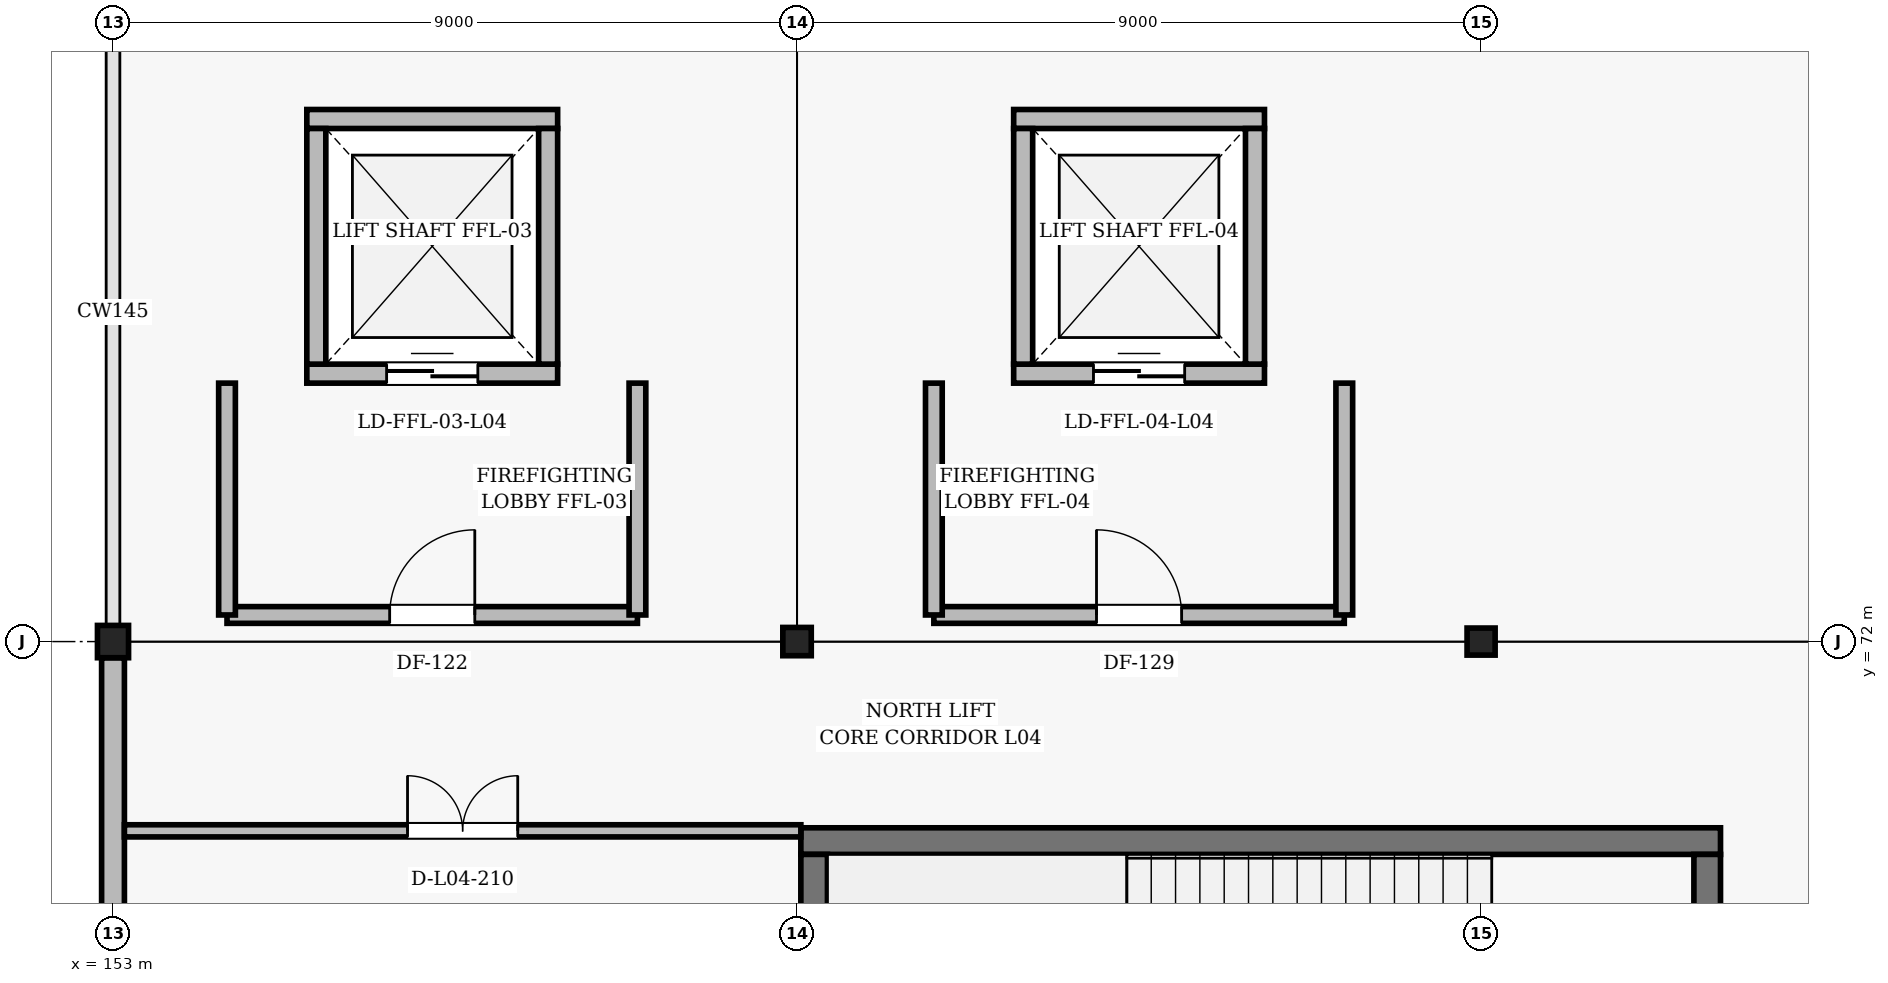
"""IFC4 building model, lengths in metres.
Left out: names, types, materials, properties, quantities, classifications, styles, units other than length and angle.
Written with IfcOpenShell. Run it as: python <this file> out.ifc"""

import sys

from ifc_helpers import new_model, si_unit, direction, frame, frame_2d, origin, origin_2d, place, context, subcontext, project, spatial, rectangle, i_section, extrude, element, fill, save


model = new_model("IFC4")
c1 = context("Model", 3, precision=1e-05, world=origin(), true_north=direction((0.0, 1.0)))
c2 = subcontext(c1, "Body", "Model", "MODEL_VIEW")
j1 = project(units=[si_unit("LENGTHUNIT", "METRE"), si_unit("PLANEANGLEUNIT", "RADIAN")], contexts=[c1])
p1 = place(None, origin())
s1 = spatial("IfcSite", under=j1, at=p1, CompositionType="ELEMENT")
p2 = place(p1, origin())
s2 = spatial("IfcBuilding", under=s1, at=p2, CompositionType="ELEMENT")
p3 = place(p2, frame((0.0, 0.0, 20.4)))
s3 = spatial("IfcBuildingStorey", under=s2, at=p3, CompositionType="ELEMENT", Elevation=20.4)
p4 = place(p3, frame((153.0, 72.0, 0.0), z_axis=(0.0, 0.0, 1.0), x_axis=(1.0, 0.0, 0.0)))
e1 = element("IfcColumn", 1, at=p4, inside=s3, PredefinedType="COLUMN", context=c2, shape_type="SweptSolid", body=[
    extrude(i_section(OverallWidth=0.409, OverallDepth=0.425, WebThickness=0.031, FlangeThickness=0.049, FilletRadius=0.02, at=origin_2d()), origin(), (0.0, 0.0, 1.0), 4.8),
])
p5 = place(p3, frame((162.0, 72.0, 0.0), z_axis=(0.0, 0.0, 1.0), x_axis=(1.0, 0.0, 0.0)))
e2 = element("IfcColumn", 2, at=p5, inside=s3, PredefinedType="COLUMN", context=c2, shape_type="SweptSolid", body=[
    extrude(i_section(OverallWidth=0.374, OverallDepth=0.372, WebThickness=0.016, FlangeThickness=0.026, FilletRadius=0.016, at=origin_2d()), origin(), (0.0, 0.0, 1.0), 4.8),
])
p6 = place(p3, frame((171.0, 72.0, 0.0), z_axis=(0.0, 0.0, 1.0), x_axis=(1.0, 0.0, 0.0)))
e3 = element("IfcColumn", 3, at=p6, inside=s3, PredefinedType="COLUMN", context=c2, shape_type="SweptSolid", body=[
    extrude(i_section(OverallWidth=0.369, OverallDepth=0.356, WebThickness=0.011, FlangeThickness=0.018, FilletRadius=0.015, at=origin_2d()), origin(), (0.0, 0.0, 1.0), 4.8),
])
p7 = place(p3, frame((153.0, 63.347, 0.0), z_axis=(0.0, 0.0, 1.0), x_axis=(0.0, 1.0, 0.0)))
e4 = element("IfcWall", 4, at=p7, inside=s3, PredefinedType="SOLIDWALL", context=c2, shape_type="SweptSolid", body=[
    extrude(rectangle(XDim=8.44, YDim=0.3, at=frame_2d((4.22, 0.0))), origin(), (0.0, 0.0, 1.0), 3.772),
])
p8 = place(p3, frame((174.15, 69.375, 0.0), z_axis=(0.0, 0.0, 1.0), x_axis=(-1.0, 0.0, 0.0)))
e5 = element("IfcWall", 5, at=p8, inside=s3, PredefinedType="SHEAR", context=c2, shape_type="SweptSolid", body=[
    extrude(rectangle(XDim=12.1, YDim=0.35, at=frame_2d((6.05, 0.0))), origin(), (0.0, 0.0, 1.0), 4.56),
])
p9 = place(p3, frame((162.225, 69.2, 0.0), z_axis=(0.0, 0.0, 1.0), x_axis=(0.0, -1.0, 0.0)))
e6 = element("IfcWall", 6, at=p9, inside=s3, PredefinedType="SHEAR", context=c2, shape_type="SweptSolid", body=[
    extrude(rectangle(XDim=5.5, YDim=0.35, at=frame_2d((2.75, 0.0))), origin(), (0.0, 0.0, 1.0), 4.56),
])
p10 = place(p3, frame((173.975, 63.7, 0.0), z_axis=(0.0, 0.0, 1.0), x_axis=(0.0, 1.0, 0.0)))
e7 = element("IfcWall", 7, at=p10, inside=s3, PredefinedType="SHEAR", context=c2, shape_type="SweptSolid", body=[
    extrude(rectangle(XDim=5.5, YDim=0.35, at=frame_2d((2.75, 0.0))), origin(), (0.0, 0.0, 1.0), 4.56),
])
p11 = place(p10, frame((1.85, 0.0, 0.0)))
e8 = element("IfcOpeningElement", 8, at=p11, cuts=e7, PredefinedType="OPENING", context=c2, shape_type="SweptSolid", body=[
    extrude(rectangle(XDim=1.8, YDim=2.2, at=frame_2d((0.9, 1.1))), frame((0.0, 0.185, 0.0), z_axis=(0.0, -1.0, 0.0), x_axis=(1.0, 0.0, 0.0)), (0.0, 0.0, 1.0), 0.37),
])
p12 = place(p3, frame((155.55, 75.525, 0.0), z_axis=(0.0, 0.0, 1.0), x_axis=(1.0, 0.0, 0.0)))
e9 = element("IfcWall", 9, at=p12, inside=s3, PredefinedType="SOLIDWALL", context=c2, shape_type="SweptSolid", body=[
    extrude(rectangle(XDim=3.3, YDim=0.25, at=frame_2d((1.65, 0.0))), origin(), (0.0, 0.0, 1.0), 4.56),
])
p13 = place(p12, frame((1.05, 0.0, 0.0)))
e10 = element("IfcOpeningElement", 10, at=p13, cuts=e9, PredefinedType="OPENING", context=c2, shape_type="SweptSolid", body=[
    extrude(rectangle(XDim=1.2, YDim=2.25, at=frame_2d((0.6, 1.125))), frame((0.0, 0.135, 0.0), z_axis=(0.0, -1.0, 0.0), x_axis=(1.0, 0.0, 0.0)), (0.0, 0.0, 1.0), 0.27),
])
p14 = place(p3, frame((158.85, 78.875, 0.0), z_axis=(0.0, 0.0, 1.0), x_axis=(-1.0, 0.0, 0.0)))
e11 = element("IfcWall", 11, at=p14, inside=s3, PredefinedType="SOLIDWALL", context=c2, shape_type="SweptSolid", body=[
    extrude(rectangle(XDim=3.3, YDim=0.25, at=frame_2d((1.65, 0.0))), origin(), (0.0, 0.0, 1.0), 4.56),
])
for number, where, z_axis, x_axis in (
    (12, (155.675, 78.75, 0.0), (0.0, 0.0, 1.0), (0.0, -1.0, 0.0)),
    (13, (158.725, 75.65, 0.0), (0.0, 0.0, 1.0), (0.0, 1.0, 0.0)),
):
    element("IfcWall", number, at=place(p3, frame(where, z_axis=z_axis, x_axis=x_axis)), inside=s3, PredefinedType="SOLIDWALL", context=c2, shape_type="SweptSolid", body=[
        extrude(rectangle(XDim=3.1, YDim=0.25, at=frame_2d((1.55, 0.0))), origin(), (0.0, 0.0, 1.0), 4.56),
    ])
p15 = place(p3, frame((154.5, 72.35, 0.0), z_axis=(0.0, 0.0, 1.0), x_axis=(1.0, 0.0, 0.0)))
e14 = element("IfcWall", 14, at=p15, inside=s3, PredefinedType="SOLIDWALL", context=c2, shape_type="SweptSolid", body=[
    extrude(rectangle(XDim=5.4, YDim=0.22, at=frame_2d((2.7, 0.0))), origin(), (0.0, 0.0, 1.0), 3.772),
])
p16 = place(p15, frame((2.14, 0.0, 0.0)))
e15 = element("IfcOpeningElement", 15, at=p16, cuts=e14, PredefinedType="OPENING", context=c2, shape_type="SweptSolid", body=[
    extrude(rectangle(XDim=1.12, YDim=2.2, at=frame_2d((0.56, 1.1))), frame((0.0, 0.12, 0.0), z_axis=(0.0, -1.0, 0.0), x_axis=(1.0, 0.0, 0.0)), (0.0, 0.0, 1.0), 0.24),
])
for number, where, z_axis, x_axis in (
    (16, (154.5, 72.35, 0.0), (0.0, 0.0, 1.0), (0.0, 1.0, 0.0)),
    (17, (159.9, 72.35, 0.0), (0.0, 0.0, 1.0), (0.0, 1.0, 0.0)),
):
    element("IfcWall", number, at=place(p3, frame(where, z_axis=z_axis, x_axis=x_axis)), inside=s3, PredefinedType="SOLIDWALL", context=c2, shape_type="SweptSolid", body=[
        extrude(rectangle(XDim=3.05, YDim=0.22, at=frame_2d((1.525, 0.0))), origin(), (0.0, 0.0, 1.0), 3.772),
    ])
p17 = place(p3, frame((164.85, 75.525, 0.0), z_axis=(0.0, 0.0, 1.0), x_axis=(1.0, 0.0, 0.0)))
e18 = element("IfcWall", 18, at=p17, inside=s3, PredefinedType="SOLIDWALL", context=c2, shape_type="SweptSolid", body=[
    extrude(rectangle(XDim=3.3, YDim=0.25, at=frame_2d((1.65, 0.0))), origin(), (0.0, 0.0, 1.0), 4.56),
])
p18 = place(p17, frame((1.05, 0.0, 0.0)))
e19 = element("IfcOpeningElement", 19, at=p18, cuts=e18, PredefinedType="OPENING", context=c2, shape_type="SweptSolid", body=[
    extrude(rectangle(XDim=1.2, YDim=2.25, at=frame_2d((0.6, 1.125))), frame((0.0, 0.135, 0.0), z_axis=(0.0, -1.0, 0.0), x_axis=(1.0, 0.0, 0.0)), (0.0, 0.0, 1.0), 0.27),
])
p19 = place(p3, frame((168.15, 78.875, 0.0), z_axis=(0.0, 0.0, 1.0), x_axis=(-1.0, 0.0, 0.0)))
e20 = element("IfcWall", 20, at=p19, inside=s3, PredefinedType="SOLIDWALL", context=c2, shape_type="SweptSolid", body=[
    extrude(rectangle(XDim=3.3, YDim=0.25, at=frame_2d((1.65, 0.0))), origin(), (0.0, 0.0, 1.0), 4.56),
])
for number, where, z_axis, x_axis in (
    (21, (164.975, 78.75, 0.0), (0.0, 0.0, 1.0), (0.0, -1.0, 0.0)),
    (22, (168.025, 75.65, 0.0), (0.0, 0.0, 1.0), (0.0, 1.0, 0.0)),
):
    element("IfcWall", number, at=place(p3, frame(where, z_axis=z_axis, x_axis=x_axis)), inside=s3, PredefinedType="SOLIDWALL", context=c2, shape_type="SweptSolid", body=[
        extrude(rectangle(XDim=3.1, YDim=0.25, at=frame_2d((1.55, 0.0))), origin(), (0.0, 0.0, 1.0), 4.56),
    ])
p20 = place(p3, frame((163.8, 72.35, 0.0), z_axis=(0.0, 0.0, 1.0), x_axis=(1.0, 0.0, 0.0)))
e23 = element("IfcWall", 23, at=p20, inside=s3, PredefinedType="SOLIDWALL", context=c2, shape_type="SweptSolid", body=[
    extrude(rectangle(XDim=5.4, YDim=0.22, at=frame_2d((2.7, 0.0))), origin(), (0.0, 0.0, 1.0), 3.85),
])
p21 = place(p20, frame((2.14, 0.0, 0.0)))
e24 = element("IfcOpeningElement", 24, at=p21, cuts=e23, PredefinedType="OPENING", context=c2, shape_type="SweptSolid", body=[
    extrude(rectangle(XDim=1.12, YDim=2.2, at=frame_2d((0.56, 1.1))), frame((0.0, 0.12, 0.0), z_axis=(0.0, -1.0, 0.0), x_axis=(1.0, 0.0, 0.0)), (0.0, 0.0, 1.0), 0.24),
])
for number, where, z_axis, x_axis in (
    (25, (163.8, 72.35, 0.0), (0.0, 0.0, 1.0), (0.0, 1.0, 0.0)),
    (26, (169.2, 72.35, 0.0), (0.0, 0.0, 1.0), (0.0, 1.0, 0.0)),
):
    element("IfcWall", number, at=place(p3, frame(where, z_axis=z_axis, x_axis=x_axis)), inside=s3, PredefinedType="SOLIDWALL", context=c2, shape_type="SweptSolid", body=[
        extrude(rectangle(XDim=3.05, YDim=0.22, at=frame_2d((1.525, 0.0))), origin(), (0.0, 0.0, 1.0), 3.85),
    ])
p22 = place(p3, frame((153.15, 69.51, 0.0), z_axis=(0.0, 0.0, 1.0), x_axis=(1.0, 0.0, 0.0)))
e27 = element("IfcWall", 27, at=p22, inside=s3, PredefinedType="PARTITIONING", context=c2, shape_type="SweptSolid", body=[
    extrude(rectangle(XDim=8.9, YDim=0.16, at=frame_2d((4.45, 0.0))), origin(), (0.0, 0.0, 1.0), 3.772),
])
p23 = place(p22, frame((3.725, 0.0, 0.0)))
e28 = element("IfcOpeningElement", 28, at=p23, cuts=e27, PredefinedType="OPENING", context=c2, shape_type="SweptSolid", body=[
    extrude(rectangle(XDim=1.45, YDim=2.3, at=frame_2d((0.725, 1.15))), frame((0.0, 0.09, 0.0), z_axis=(0.0, -1.0, 0.0), x_axis=(1.0, 0.0, 0.0)), (0.0, 0.0, 1.0), 0.18),
])
p24 = place(p13, origin())
e29 = element("IfcDoor", 29, at=p24, inside=s3, OperationType="DOUBLE_DOOR_SLIDING", PredefinedType="DOOR", context=c2, shape_type="SweptSolid", body=[
    extrude(rectangle(XDim=1.2, YDim=2.25, at=frame_2d((0.6, 1.125))), frame((0.0, 0.025, 0.0), z_axis=(0.0, -1.0, 0.0), x_axis=(1.0, 0.0, 0.0)), (0.0, 0.0, 1.0), 0.05),
])
fill(e10, e29)
p25 = place(p16, origin())
e30 = element("IfcDoor", 30, at=p25, inside=s3, OperationType="SINGLE_SWING_RIGHT", PredefinedType="DOOR", context=c2, shape_type="SweptSolid", body=[
    extrude(rectangle(XDim=1.12, YDim=2.2, at=frame_2d((0.56, 1.1))), frame((0.0, 0.025, 0.0), z_axis=(0.0, -1.0, 0.0), x_axis=(1.0, 0.0, 0.0)), (0.0, 0.0, 1.0), 0.05),
])
fill(e15, e30)
p26 = place(p18, origin())
e31 = element("IfcDoor", 31, at=p26, inside=s3, OperationType="DOUBLE_DOOR_SLIDING", PredefinedType="DOOR", context=c2, shape_type="SweptSolid", body=[
    extrude(rectangle(XDim=1.2, YDim=2.25, at=frame_2d((0.6, 1.125))), frame((0.0, 0.025, 0.0), z_axis=(0.0, -1.0, 0.0), x_axis=(1.0, 0.0, 0.0)), (0.0, 0.0, 1.0), 0.05),
])
fill(e19, e31)
p27 = place(p21, origin())
e32 = element("IfcDoor", 32, at=p27, inside=s3, OperationType="SINGLE_SWING_LEFT", PredefinedType="DOOR", context=c2, shape_type="SweptSolid", body=[
    extrude(rectangle(XDim=1.12, YDim=2.2, at=frame_2d((0.56, 1.1))), frame((0.0, 0.025, 0.0), z_axis=(0.0, -1.0, 0.0), x_axis=(1.0, 0.0, 0.0)), (0.0, 0.0, 1.0), 0.05),
])
fill(e24, e32)
p28 = place(p23, origin())
e33 = element("IfcDoor", 33, at=p28, inside=s3, OperationType="DOUBLE_DOOR_SINGLE_SWING", PredefinedType="DOOR", context=c2, shape_type="SweptSolid", body=[
    extrude(rectangle(XDim=1.45, YDim=2.3, at=frame_2d((0.725, 1.15))), frame((0.0, 0.025, 0.0), z_axis=(0.0, -1.0, 0.0), x_axis=(1.0, 0.0, 0.0)), (0.0, 0.0, 1.0), 0.05),
])
fill(e28, e33)
save(model, sys.argv[1])
